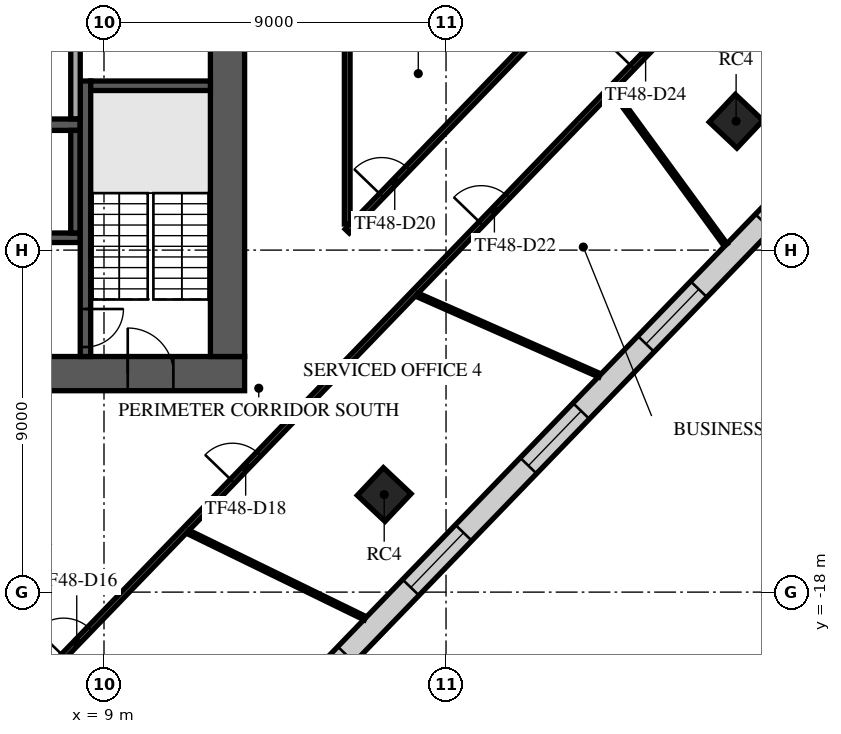
"""IFC4 building model, lengths in metres.
Left out: names, types, materials, properties, quantities, classifications, styles, units other than length and angle.
Written with IfcOpenShell. Run it as: python <this file> out.ifc"""

import sys

from ifc_helpers import new_model, si_unit, direction, frame, frame_2d, origin, origin_2d, place, context, subcontext, project, spatial, rectangle, extrude, element, fill, save


model = new_model("IFC4")
c1 = context("Model", 3, precision=1e-05, world=origin(), true_north=direction((0.0, 1.0)))
c2 = subcontext(c1, "Body", "Model", "MODEL_VIEW")
j1 = project(units=[si_unit("LENGTHUNIT", "METRE"), si_unit("PLANEANGLEUNIT", "RADIAN")], contexts=[c1])
p1 = place(None, origin())
s1 = spatial("IfcSite", under=j1, at=p1, CompositionType="ELEMENT")
p2 = place(p1, origin())
s2 = spatial("IfcBuilding", under=s1, at=p2, CompositionType="ELEMENT")
p3 = place(p2, frame((0.0, 0.0, 205.3)))
s3 = spatial("IfcBuildingStorey", under=s2, at=p3, CompositionType="ELEMENT", Elevation=205.3)
for number, where, z_axis, x_axis in (
    (1, (16.373, -15.433, 0.0), (0.0, 0.0, 1.0), (0.686, 0.728, 0.0)),
    (2, (25.633, -5.609, 0.0), (0.0, 0.0, 1.0), (0.686, 0.728, 0.0)),
):
    element("IfcColumn", number, at=place(p3, frame(where, z_axis=z_axis, x_axis=x_axis)), inside=s3, PredefinedType="COLUMN", context=c2, shape_type="SweptSolid", body=[
        extrude(rectangle(XDim=1.0, YDim=1.0, at=origin_2d()), origin(), (0.0, 0.0, 1.0), 4.0),
    ])
p4 = place(p3, frame((-12.7, -12.25, 0.0), z_axis=(0.0, 0.0, 1.0), x_axis=(1.0, 0.0, 0.0)))
e3 = element("IfcWall", 3, at=p4, inside=s3, PredefinedType="SHEAR", context=c2, shape_type="SweptSolid", body=[
    extrude(rectangle(XDim=25.4, YDim=0.9, at=frame_2d((12.7, 0.0))), origin(), (0.0, 0.0, 1.0), 3.62),
])
p5 = place(p4, frame((7.6, 0.0, 0.0)))
e4 = element("IfcOpeningElement", 4, at=p5, cuts=e3, PredefinedType="OPENING", context=c2, shape_type="SweptSolid", body=[
    extrude(rectangle(XDim=2.0, YDim=2.1, at=frame_2d((1.0, 1.05))), frame((0.0, 0.46, 0.0), z_axis=(0.0, -1.0, 0.0), x_axis=(1.0, 0.0, 0.0)), (0.0, 0.0, 1.0), 0.92),
])
p6 = place(p4, frame((17.725, 0.0, 0.0)))
e5 = element("IfcOpeningElement", 5, at=p6, cuts=e3, PredefinedType="OPENING", context=c2, shape_type="SweptSolid", body=[
    extrude(rectangle(XDim=1.2, YDim=2.1, at=frame_2d((0.6, 1.05))), frame((0.0, 0.46, 0.0), z_axis=(0.0, -1.0, 0.0), x_axis=(1.0, 0.0, 0.0)), (0.0, 0.0, 1.0), 0.92),
])
p7 = place(p4, frame((1.875, 0.0, 0.0)))
e6 = element("IfcOpeningElement", 6, at=p7, cuts=e3, PredefinedType="OPENING", context=c2, shape_type="SweptSolid", body=[
    extrude(rectangle(XDim=1.2, YDim=2.1, at=frame_2d((0.6, 1.05))), frame((0.0, 0.46, 0.0), z_axis=(0.0, -1.0, 0.0), x_axis=(1.0, 0.0, 0.0)), (0.0, 0.0, 1.0), 0.92),
])
p8 = place(p4, frame((22.325, 0.0, 0.0)))
e7 = element("IfcOpeningElement", 7, at=p8, cuts=e3, PredefinedType="OPENING", context=c2, shape_type="SweptSolid", body=[
    extrude(rectangle(XDim=1.2, YDim=2.1, at=frame_2d((0.6, 1.05))), frame((0.0, 0.46, 0.0), z_axis=(0.0, -1.0, 0.0), x_axis=(1.0, 0.0, 0.0)), (0.0, 0.0, 1.0), 0.92),
])
p9 = place(p3, frame((12.25, -11.8, 0.0), z_axis=(0.0, 0.0, 1.0), x_axis=(0.0, 1.0, 0.0)))
e8 = element("IfcWall", 8, at=p9, inside=s3, PredefinedType="SHEAR", context=c2, shape_type="SweptSolid", body=[
    extrude(rectangle(XDim=23.6, YDim=0.9, at=frame_2d((11.8, 0.0))), origin(), (0.0, 0.0, 1.0), 3.62),
])
p10 = place(p9, frame((10.6, 0.0, 0.0)))
e9 = element("IfcOpeningElement", 9, at=p10, cuts=e8, PredefinedType="OPENING", context=c2, shape_type="SweptSolid", body=[
    extrude(rectangle(XDim=2.4, YDim=2.4, at=frame_2d((1.2, 1.2))), frame((0.0, 0.46, 0.0), z_axis=(0.0, -1.0, 0.0), x_axis=(1.0, 0.0, 0.0)), (0.0, 0.0, 1.0), 0.92),
])
p11 = place(p3, frame((-2.875, -5.7, 0.0), z_axis=(0.0, 0.0, 1.0), x_axis=(1.0, 0.0, 0.0)))
e10 = element("IfcWall", 10, at=p11, inside=s3, PredefinedType="SOLIDWALL", context=c2, shape_type="SweptSolid", body=[
    extrude(rectangle(XDim=11.25, YDim=0.3, at=frame_2d((5.625, 0.0))), origin(), (0.0, 0.0, 1.0), 3.62),
])
p12 = place(p3, frame((-2.875, -8.675, 0.0), z_axis=(0.0, 0.0, 1.0), x_axis=(1.0, 0.0, 0.0)))
e11 = element("IfcWall", 11, at=p12, inside=s3, PredefinedType="SOLIDWALL", context=c2, shape_type="SweptSolid", body=[
    extrude(rectangle(XDim=11.25, YDim=0.25, at=frame_2d((5.625, 0.0))), origin(), (0.0, 0.0, 1.0), 3.62),
])
p13 = place(p12, frame((0.9, 0.0, 0.0)))
e12 = element("IfcOpeningElement", 12, at=p13, cuts=e11, PredefinedType="OPENING", context=c2, shape_type="SweptSolid", body=[
    extrude(rectangle(XDim=1.2, YDim=2.1, at=frame_2d((0.6, 1.05))), frame((0.0, 0.135, 0.0), z_axis=(0.0, -1.0, 0.0), x_axis=(1.0, 0.0, 0.0)), (0.0, 0.0, 1.0), 0.27),
])
p14 = place(p12, frame((3.65, 0.0, 0.0)))
e13 = element("IfcOpeningElement", 13, at=p14, cuts=e11, PredefinedType="OPENING", context=c2, shape_type="SweptSolid", body=[
    extrude(rectangle(XDim=1.2, YDim=2.1, at=frame_2d((0.6, 1.05))), frame((0.0, 0.135, 0.0), z_axis=(0.0, -1.0, 0.0), x_axis=(1.0, 0.0, 0.0)), (0.0, 0.0, 1.0), 0.27),
])
p15 = place(p12, frame((6.4, 0.0, 0.0)))
e14 = element("IfcOpeningElement", 14, at=p15, cuts=e11, PredefinedType="OPENING", context=c2, shape_type="SweptSolid", body=[
    extrude(rectangle(XDim=1.2, YDim=2.1, at=frame_2d((0.6, 1.05))), frame((0.0, 0.135, 0.0), z_axis=(0.0, -1.0, 0.0), x_axis=(1.0, 0.0, 0.0)), (0.0, 0.0, 1.0), 0.27),
])
p16 = place(p12, frame((9.15, 0.0, 0.0)))
e15 = element("IfcOpeningElement", 15, at=p16, cuts=e11, PredefinedType="OPENING", context=c2, shape_type="SweptSolid", body=[
    extrude(rectangle(XDim=1.2, YDim=2.1, at=frame_2d((0.6, 1.05))), frame((0.0, 0.135, 0.0), z_axis=(0.0, -1.0, 0.0), x_axis=(1.0, 0.0, 0.0)), (0.0, 0.0, 1.0), 0.27),
])
p17 = place(p3, frame((8.25, -8.55, 0.0), z_axis=(0.0, 0.0, 1.0), x_axis=(0.0, 1.0, 0.0)))
e16 = element("IfcWall", 16, at=p17, inside=s3, PredefinedType="SOLIDWALL", context=c2, shape_type="SweptSolid", body=[
    extrude(rectangle(XDim=2.7, YDim=0.25, at=frame_2d((1.35, 0.0))), origin(), (0.0, 0.0, 1.0), 3.62),
])
p18 = place(p3, frame((8.512, -4.55, 0.0), z_axis=(0.0, 0.0, 1.0), x_axis=(0.0, -1.0, 0.0)))
e17 = element("IfcWall", 17, at=p18, inside=s3, PredefinedType="SOLIDWALL", context=c2, shape_type="SweptSolid", body=[
    extrude(rectangle(XDim=7.25, YDim=0.275, at=frame_2d((3.625, 0.0))), origin(), (0.0, 0.0, 1.0), 3.62),
])
p19 = place(p18, frame((6.0, 0.0, 0.0)))
e18 = element("IfcOpeningElement", 18, at=p19, cuts=e17, PredefinedType="OPENING", context=c2, shape_type="SweptSolid", body=[
    extrude(rectangle(XDim=1.0, YDim=2.1, at=frame_2d((0.5, 1.05))), frame((0.0, 0.147, 0.0), z_axis=(0.0, -1.0, 0.0), x_axis=(1.0, 0.0, 0.0)), (0.0, 0.0, 1.0), 0.295),
])
p20 = place(p3, frame((8.65, -4.675, 0.0), z_axis=(0.0, 0.0, 1.0), x_axis=(1.0, 0.0, 0.0)))
e19 = element("IfcWall", 19, at=p20, inside=s3, PredefinedType="SOLIDWALL", context=c2, shape_type="SweptSolid", body=[
    extrude(rectangle(XDim=3.15, YDim=0.25, at=frame_2d((1.575, 0.0))), origin(), (0.0, 0.0, 1.0), 3.62),
])
p21 = place(p3, frame((8.25, -5.545, 0.0), z_axis=(0.0, 0.0, 1.0), x_axis=(0.0, 1.0, 0.0)))
e20 = element("IfcWall", 20, at=p21, inside=s3, PredefinedType="PARTITIONING", context=c2, shape_type="SweptSolid", body=[
    extrude(rectangle(XDim=2.69, YDim=0.25, at=frame_2d((1.345, 0.0))), origin(), (0.0, 0.0, 1.0), 3.62),
])
p22 = place(p3, frame((0.749, -34.782, 0.0), z_axis=(0.0, 0.0, 1.0), x_axis=(0.694657553534, 0.719340589233, 0.0)))
e21 = element("IfcWall", 21, at=p22, inside=s3, PredefinedType="STANDARD", context=c2, shape_type="SweptSolid", body=[
    extrude(rectangle(XDim=49.0, YDim=0.6, at=frame_2d((24.5, 0.0))), origin(), (0.0, 0.0, 1.0), 3.62),
])
p23 = place(p22, frame((1.227, 0.0, 0.9)))
e22 = element("IfcOpeningElement", 22, at=p23, cuts=e21, PredefinedType="OPENING", context=c2, shape_type="SweptSolid", body=[
    extrude(rectangle(XDim=2.0, YDim=2.1, at=frame_2d((1.0, 1.05))), frame((0.0, 0.31, 0.0), z_axis=(0.0, -1.0, 0.0), x_axis=(1.0, 0.0, 0.0)), (0.0, 0.0, 1.0), 0.62),
])
p24 = place(p22, frame((5.682, 0.0, 0.9)))
e23 = element("IfcOpeningElement", 23, at=p24, cuts=e21, PredefinedType="OPENING", context=c2, shape_type="SweptSolid", body=[
    extrude(rectangle(XDim=2.0, YDim=2.1, at=frame_2d((1.0, 1.05))), frame((0.0, 0.31, 0.0), z_axis=(0.0, -1.0, 0.0), x_axis=(1.0, 0.0, 0.0)), (0.0, 0.0, 1.0), 0.62),
])
p25 = place(p22, frame((10.136, 0.0, 0.9)))
e24 = element("IfcOpeningElement", 24, at=p25, cuts=e21, PredefinedType="OPENING", context=c2, shape_type="SweptSolid", body=[
    extrude(rectangle(XDim=2.0, YDim=2.1, at=frame_2d((1.0, 1.05))), frame((0.0, 0.31, 0.0), z_axis=(0.0, -1.0, 0.0), x_axis=(1.0, 0.0, 0.0)), (0.0, 0.0, 1.0), 0.62),
])
p26 = place(p22, frame((14.591, 0.0, 0.9)))
e25 = element("IfcOpeningElement", 25, at=p26, cuts=e21, PredefinedType="OPENING", context=c2, shape_type="SweptSolid", body=[
    extrude(rectangle(XDim=2.0, YDim=2.1, at=frame_2d((1.0, 1.05))), frame((0.0, 0.31, 0.0), z_axis=(0.0, -1.0, 0.0), x_axis=(1.0, 0.0, 0.0)), (0.0, 0.0, 1.0), 0.62),
])
p27 = place(p22, frame((19.045, 0.0, 0.9)))
e26 = element("IfcOpeningElement", 26, at=p27, cuts=e21, PredefinedType="OPENING", context=c2, shape_type="SweptSolid", body=[
    extrude(rectangle(XDim=2.0, YDim=2.1, at=frame_2d((1.0, 1.05))), frame((0.0, 0.31, 0.0), z_axis=(0.0, -1.0, 0.0), x_axis=(1.0, 0.0, 0.0)), (0.0, 0.0, 1.0), 0.62),
])
p28 = place(p22, frame((23.5, 0.0, 0.9)))
e27 = element("IfcOpeningElement", 27, at=p28, cuts=e21, PredefinedType="OPENING", context=c2, shape_type="SweptSolid", body=[
    extrude(rectangle(XDim=2.0, YDim=2.1, at=frame_2d((1.0, 1.05))), frame((0.0, 0.31, 0.0), z_axis=(0.0, -1.0, 0.0), x_axis=(1.0, 0.0, 0.0)), (0.0, 0.0, 1.0), 0.62),
])
p29 = place(p22, frame((27.955, 0.0, 0.9)))
e28 = element("IfcOpeningElement", 28, at=p29, cuts=e21, PredefinedType="OPENING", context=c2, shape_type="SweptSolid", body=[
    extrude(rectangle(XDim=2.0, YDim=2.1, at=frame_2d((1.0, 1.05))), frame((0.0, 0.31, 0.0), z_axis=(0.0, -1.0, 0.0), x_axis=(1.0, 0.0, 0.0)), (0.0, 0.0, 1.0), 0.62),
])
p30 = place(p22, frame((32.409, 0.0, 0.9)))
e29 = element("IfcOpeningElement", 29, at=p30, cuts=e21, PredefinedType="OPENING", context=c2, shape_type="SweptSolid", body=[
    extrude(rectangle(XDim=2.0, YDim=2.1, at=frame_2d((1.0, 1.05))), frame((0.0, 0.31, 0.0), z_axis=(0.0, -1.0, 0.0), x_axis=(1.0, 0.0, 0.0)), (0.0, 0.0, 1.0), 0.62),
])
p31 = place(p22, frame((36.864, 0.0, 0.9)))
e30 = element("IfcOpeningElement", 30, at=p31, cuts=e21, PredefinedType="OPENING", context=c2, shape_type="SweptSolid", body=[
    extrude(rectangle(XDim=2.0, YDim=2.1, at=frame_2d((1.0, 1.05))), frame((0.0, 0.31, 0.0), z_axis=(0.0, -1.0, 0.0), x_axis=(1.0, 0.0, 0.0)), (0.0, 0.0, 1.0), 0.62),
])
p32 = place(p22, frame((41.318, 0.0, 0.9)))
e31 = element("IfcOpeningElement", 31, at=p32, cuts=e21, PredefinedType="OPENING", context=c2, shape_type="SweptSolid", body=[
    extrude(rectangle(XDim=2.0, YDim=2.1, at=frame_2d((1.0, 1.05))), frame((0.0, 0.31, 0.0), z_axis=(0.0, -1.0, 0.0), x_axis=(1.0, 0.0, 0.0)), (0.0, 0.0, 1.0), 0.62),
])
p33 = place(p22, frame((45.773, 0.0, 0.9)))
e32 = element("IfcOpeningElement", 32, at=p33, cuts=e21, PredefinedType="OPENING", context=c2, shape_type="SweptSolid", body=[
    extrude(rectangle(XDim=2.0, YDim=2.1, at=frame_2d((1.0, 1.05))), frame((0.0, 0.31, 0.0), z_axis=(0.0, -1.0, 0.0), x_axis=(1.0, 0.0, 0.0)), (0.0, 0.0, 1.0), 0.62),
])
p34 = place(p3, frame((0.977, -26.89, 0.0), z_axis=(0.0, 0.0, 1.0), x_axis=(0.694659509326, 0.719338700546, 0.0)))
e33 = element("IfcWall", 33, at=p34, inside=s3, PredefinedType="PARTITIONING", context=c2, shape_type="SweptSolid", body=[
    extrude(rectangle(XDim=37.404, YDim=0.15, at=frame_2d((18.702, 0.0))), origin(), (0.0, 0.0, 1.0), 3.17),
])
p35 = place(p34, frame((10.017, 0.0, 0.0)))
e34 = element("IfcOpeningElement", 34, at=p35, cuts=e33, PredefinedType="OPENING", context=c2, shape_type="SweptSolid", body=[
    extrude(rectangle(XDim=1.0, YDim=2.1, at=frame_2d((0.5, 1.05))), frame((0.0, 0.085, 0.0), z_axis=(0.0, -1.0, 0.0), x_axis=(1.0, 0.0, 0.0)), (0.0, 0.0, 1.0), 0.17),
])
p36 = place(p34, frame((16.416, 0.0, 0.0)))
e35 = element("IfcOpeningElement", 35, at=p36, cuts=e33, PredefinedType="OPENING", context=c2, shape_type="SweptSolid", body=[
    extrude(rectangle(XDim=1.0, YDim=2.1, at=frame_2d((0.5, 1.05))), frame((0.0, 0.085, 0.0), z_axis=(0.0, -1.0, 0.0), x_axis=(1.0, 0.0, 0.0)), (0.0, 0.0, 1.0), 0.17),
])
p37 = place(p34, frame((25.838, 0.0, 0.0)))
e36 = element("IfcOpeningElement", 36, at=p37, cuts=e33, PredefinedType="OPENING", context=c2, shape_type="SweptSolid", body=[
    extrude(rectangle(XDim=1.0, YDim=2.1, at=frame_2d((0.5, 1.05))), frame((0.0, 0.085, 0.0), z_axis=(0.0, -1.0, 0.0), x_axis=(1.0, 0.0, 0.0)), (0.0, 0.0, 1.0), 0.17),
])
p38 = place(p34, frame((31.566, 0.0, 0.0)))
e37 = element("IfcOpeningElement", 37, at=p38, cuts=e33, PredefinedType="OPENING", context=c2, shape_type="SweptSolid", body=[
    extrude(rectangle(XDim=1.0, YDim=2.1, at=frame_2d((0.5, 1.05))), frame((0.0, 0.085, 0.0), z_axis=(0.0, -1.0, 0.0), x_axis=(1.0, 0.0, 0.0)), (0.0, 0.0, 1.0), 0.17),
])
p39 = place(p3, frame((15.4, -8.5, 0.0), z_axis=(0.0, 0.0, 1.0), x_axis=(0.694668375929, 0.719330138034, 0.0)))
e38 = element("IfcWall", 38, at=p39, inside=s3, PredefinedType="PARTITIONING", context=c2, shape_type="SweptSolid", body=[
    extrude(rectangle(XDim=14.156, YDim=0.15, at=frame_2d((7.078, 0.0))), origin(), (0.0, 0.0, 1.0), 3.17),
])
p40 = place(p39, frame((1.3, 0.0, 0.0)))
e39 = element("IfcOpeningElement", 39, at=p40, cuts=e38, PredefinedType="OPENING", context=c2, shape_type="SweptSolid", body=[
    extrude(rectangle(XDim=1.0, YDim=2.1, at=frame_2d((0.5, 1.05))), frame((0.0, 0.085, 0.0), z_axis=(0.0, -1.0, 0.0), x_axis=(1.0, 0.0, 0.0)), (0.0, 0.0, 1.0), 0.17),
])
p41 = place(p3, frame((15.4, -8.314, 0.0), z_axis=(0.0, 0.0, 1.0), x_axis=(0.0, 1.0, 0.0)))
e40 = element("IfcWall", 40, at=p41, inside=s3, PredefinedType="PARTITIONING", context=c2, shape_type="SweptSolid", body=[
    extrude(rectangle(XDim=20.874, YDim=0.15, at=frame_2d((10.437, 0.0))), origin(), (0.0, 0.0, 1.0), 3.17),
])
p42 = place(p41, frame((17.158, 0.0, 0.0)))
e41 = element("IfcOpeningElement", 41, at=p42, cuts=e40, PredefinedType="OPENING", context=c2, shape_type="SweptSolid", body=[
    extrude(rectangle(XDim=1.0, YDim=2.1, at=frame_2d((0.5, 1.05))), frame((0.0, 0.085, 0.0), z_axis=(0.0, -1.0, 0.0), x_axis=(1.0, 0.0, 0.0)), (0.0, 0.0, 1.0), 0.17),
])
p43 = place(p3, frame((11.216, -16.418, 0.0), z_axis=(0.0, 0.0, 1.0), x_axis=(0.898851336675, -0.438253664625, 0.0)))
e42 = element("IfcWall", 42, at=p43, inside=s3, PredefinedType="PARTITIONING", context=c2, shape_type="SweptSolid", body=[
    extrude(rectangle(XDim=5.179, YDim=0.1, at=frame_2d((2.59, 0.0))), origin(), (0.0, 0.0, 1.0), 2.97),
])
p44 = place(p3, frame((17.244, -10.178, 0.0), z_axis=(0.0, 0.0, 1.0), x_axis=(0.914761015663, -0.403995401239, 0.0)))
e43 = element("IfcWall", 43, at=p44, inside=s3, PredefinedType="PARTITIONING", context=c2, shape_type="SweptSolid", body=[
    extrude(rectangle(XDim=5.245, YDim=0.1, at=frame_2d((2.623, 0.0))), origin(), (0.0, 0.0, 1.0), 2.97),
])
p45 = place(p3, frame((22.404, -4.823, 0.0), z_axis=(0.0, 0.0, 1.0), x_axis=(0.590034932846, -0.80737771707, 0.0)))
e44 = element("IfcWall", 44, at=p45, inside=s3, PredefinedType="PARTITIONING", context=c2, shape_type="SweptSolid", body=[
    extrude(rectangle(XDim=5.005, YDim=0.1, at=frame_2d((2.503, 0.0))), origin(), (0.0, 0.0, 1.0), 2.97),
])
p46 = place(p8, origin())
e45 = element("IfcDoor", 45, at=p46, inside=s3, OperationType="SINGLE_SWING_LEFT", PredefinedType="DOOR", context=c2, shape_type="SweptSolid", body=[
    extrude(rectangle(XDim=1.2, YDim=2.1, at=frame_2d((0.6, 1.05))), frame((0.0, 0.025, 0.0), z_axis=(0.0, -1.0, 0.0), x_axis=(1.0, 0.0, 0.0)), (0.0, 0.0, 1.0), 0.05),
])
fill(e7, e45)
p47 = place(p19, origin())
e46 = element("IfcDoor", 46, at=p47, inside=s3, OperationType="SINGLE_SWING_LEFT", PredefinedType="DOOR", context=c2, shape_type="SweptSolid", body=[
    extrude(rectangle(XDim=1.0, YDim=2.1, at=frame_2d((0.5, 1.05))), frame((0.0, 0.025, 0.0), z_axis=(0.0, -1.0, 0.0), x_axis=(1.0, 0.0, 0.0)), (0.0, 0.0, 1.0), 0.05),
])
fill(e18, e46)
p48 = place(p27, origin())
e47 = element("IfcWindow", 47, at=p48, inside=s3, PartitioningType="SINGLE_PANEL", PredefinedType="WINDOW", context=c2, shape_type="SweptSolid", body=[
    extrude(rectangle(XDim=2.0, YDim=2.1, at=frame_2d((1.0, 1.05))), frame((0.0, 0.03, 0.0), z_axis=(0.0, -1.0, 0.0), x_axis=(1.0, 0.0, 0.0)), (0.0, 0.0, 1.0), 0.06),
])
fill(e26, e47)
p49 = place(p28, origin())
e48 = element("IfcWindow", 48, at=p49, inside=s3, PartitioningType="SINGLE_PANEL", PredefinedType="WINDOW", context=c2, shape_type="SweptSolid", body=[
    extrude(rectangle(XDim=2.0, YDim=2.1, at=frame_2d((1.0, 1.05))), frame((0.0, 0.03, 0.0), z_axis=(0.0, -1.0, 0.0), x_axis=(1.0, 0.0, 0.0)), (0.0, 0.0, 1.0), 0.06),
])
fill(e27, e48)
p50 = place(p29, origin())
e49 = element("IfcWindow", 49, at=p50, inside=s3, PartitioningType="SINGLE_PANEL", PredefinedType="WINDOW", context=c2, shape_type="SweptSolid", body=[
    extrude(rectangle(XDim=2.0, YDim=2.1, at=frame_2d((1.0, 1.05))), frame((0.0, 0.03, 0.0), z_axis=(0.0, -1.0, 0.0), x_axis=(1.0, 0.0, 0.0)), (0.0, 0.0, 1.0), 0.06),
])
fill(e28, e49)
p51 = place(p30, origin())
e50 = element("IfcWindow", 50, at=p51, inside=s3, PartitioningType="SINGLE_PANEL", PredefinedType="WINDOW", context=c2, shape_type="SweptSolid", body=[
    extrude(rectangle(XDim=2.0, YDim=2.1, at=frame_2d((1.0, 1.05))), frame((0.0, 0.03, 0.0), z_axis=(0.0, -1.0, 0.0), x_axis=(1.0, 0.0, 0.0)), (0.0, 0.0, 1.0), 0.06),
])
fill(e29, e50)
p52 = place(p35, frame((1.0, 0.0, 0.0), z_axis=(0.0, 0.0, 1.0), x_axis=(-1.0, 0.0, 0.0)))
e51 = element("IfcDoor", 51, at=p52, inside=s3, OperationType="SINGLE_SWING_LEFT", PredefinedType="DOOR", context=c2, shape_type="SweptSolid", body=[
    extrude(rectangle(XDim=1.0, YDim=2.1, at=frame_2d((0.5, 1.05))), frame((0.0, 0.025, 0.0), z_axis=(0.0, -1.0, 0.0), x_axis=(1.0, 0.0, 0.0)), (0.0, 0.0, 1.0), 0.05),
])
fill(e34, e51)
p53 = place(p36, frame((1.0, 0.0, 0.0), z_axis=(0.0, 0.0, 1.0), x_axis=(-1.0, 0.0, 0.0)))
e52 = element("IfcDoor", 52, at=p53, inside=s3, OperationType="SINGLE_SWING_RIGHT", PredefinedType="DOOR", context=c2, shape_type="SweptSolid", body=[
    extrude(rectangle(XDim=1.0, YDim=2.1, at=frame_2d((0.5, 1.05))), frame((0.0, 0.025, 0.0), z_axis=(0.0, -1.0, 0.0), x_axis=(1.0, 0.0, 0.0)), (0.0, 0.0, 1.0), 0.05),
])
fill(e35, e52)
p54 = place(p40, origin())
e53 = element("IfcDoor", 53, at=p54, inside=s3, OperationType="SINGLE_SWING_RIGHT", PredefinedType="DOOR", context=c2, shape_type="SweptSolid", body=[
    extrude(rectangle(XDim=1.0, YDim=2.1, at=frame_2d((0.5, 1.05))), frame((0.0, 0.025, 0.0), z_axis=(0.0, -1.0, 0.0), x_axis=(1.0, 0.0, 0.0)), (0.0, 0.0, 1.0), 0.05),
])
fill(e39, e53)
p55 = place(p37, frame((1.0, 0.0, 0.0), z_axis=(0.0, 0.0, 1.0), x_axis=(-1.0, 0.0, 0.0)))
e54 = element("IfcDoor", 54, at=p55, inside=s3, OperationType="SINGLE_SWING_RIGHT", PredefinedType="DOOR", context=c2, shape_type="SweptSolid", body=[
    extrude(rectangle(XDim=1.0, YDim=2.1, at=frame_2d((0.5, 1.05))), frame((0.0, 0.025, 0.0), z_axis=(0.0, -1.0, 0.0), x_axis=(1.0, 0.0, 0.0)), (0.0, 0.0, 1.0), 0.05),
])
fill(e36, e54)
p56 = place(p38, frame((1.0, 0.0, 0.0), z_axis=(0.0, 0.0, 1.0), x_axis=(-1.0, 0.0, 0.0)))
e55 = element("IfcDoor", 55, at=p56, inside=s3, OperationType="SINGLE_SWING_RIGHT", PredefinedType="DOOR", context=c2, shape_type="SweptSolid", body=[
    extrude(rectangle(XDim=1.0, YDim=2.1, at=frame_2d((0.5, 1.05))), frame((0.0, 0.025, 0.0), z_axis=(0.0, -1.0, 0.0), x_axis=(1.0, 0.0, 0.0)), (0.0, 0.0, 1.0), 0.05),
])
fill(e37, e55)
save(model, sys.argv[1])
